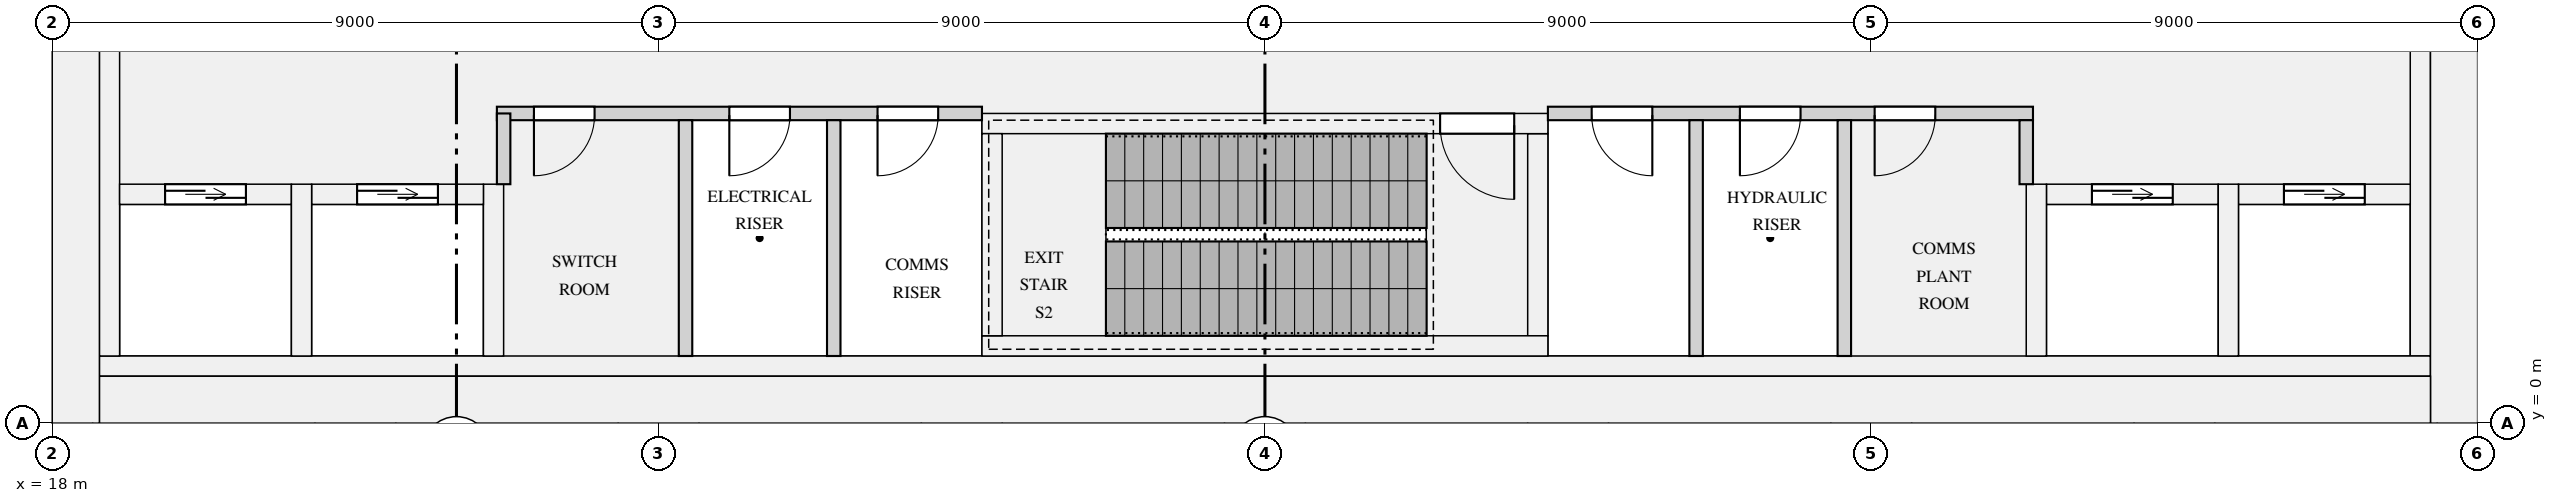
"""IFC4 building model, lengths in metres.
Left out: names, types, materials, properties, quantities, classifications, styles, units other than length and angle.
Written with IfcOpenShell. Run it as: python <this file> out.ifc"""

import sys

from ifc_helpers import new_model, si_unit, direction, frame, frame_2d, origin, place, context, subcontext, project, spatial, rectangle, extrude, element, fill, save


model = new_model("IFC4")
c1 = context("Model", 3, precision=1e-05, world=origin(), true_north=direction((0.0, 1.0)))
c2 = subcontext(c1, "Body", "Model", "MODEL_VIEW")
j1 = project(units=[si_unit("LENGTHUNIT", "METRE"), si_unit("PLANEANGLEUNIT", "RADIAN")], contexts=[c1])
p1 = place(None, origin())
s1 = spatial("IfcSite", under=j1, at=p1, CompositionType="ELEMENT")
p2 = place(p1, origin())
s2 = spatial("IfcBuilding", under=s1, at=p2, CompositionType="ELEMENT")
p3 = place(p2, frame((0.0, 0.0, 185.4)))
s3 = spatial("IfcBuildingStorey", under=s2, at=p3, CompositionType="ELEMENT", Elevation=185.4)
for number, where, z_axis, x_axis in (
    (1, (18.35, 0.0, 0.0), (0.0, 0.0, 1.0), (0.0, 1.0, 0.0)),
    (2, (53.65, 0.0, 0.0), (0.0, 0.0, 1.0), (0.0, 1.0, 0.0)),
):
    element("IfcWall", number, at=place(p3, frame(where, z_axis=z_axis, x_axis=x_axis)), inside=s3, PredefinedType="SHEAR", context=c2, shape_type="SweptSolid", body=[
        extrude(rectangle(XDim=12.5, YDim=0.7, at=frame_2d((6.25, 0.0))), origin(), (0.0, 0.0, 1.0), 6.3),
    ])
p4 = place(p3, frame((18.7, 0.35, 0.0), z_axis=(0.0, 0.0, 1.0), x_axis=(1.0, 0.0, 0.0)))
e3 = element("IfcWall", 3, at=p4, inside=s3, PredefinedType="SHEAR", context=c2, shape_type="SweptSolid", body=[
    extrude(rectangle(XDim=34.6, YDim=0.7, at=frame_2d((17.3, 0.0))), origin(), (0.0, 0.0, 1.0), 6.3),
])
for number, where, z_axis, x_axis in (
    (4, (18.85, 1.0, 0.0), (0.0, 0.0, 1.0), (0.0, 1.0, 0.0)),
    (5, (53.15, 1.0, 0.0), (0.0, 0.0, 1.0), (0.0, 1.0, 0.0)),
):
    element("IfcWall", number, at=place(p3, frame(where, z_axis=z_axis, x_axis=x_axis)), inside=s3, PredefinedType="SHEAR", context=c2, shape_type="SweptSolid", body=[
        extrude(rectangle(XDim=10.9, YDim=0.3, at=frame_2d((5.45, 0.0))), origin(), (0.0, 0.0, 1.0), 6.3),
    ])
p5 = place(p3, frame((18.7, 0.85, 0.0), z_axis=(0.0, 0.0, 1.0), x_axis=(1.0, 0.0, 0.0)))
e6 = element("IfcWall", 6, at=p5, inside=s3, PredefinedType="SHEAR", context=c2, shape_type="SweptSolid", body=[
    extrude(rectangle(XDim=34.6, YDim=0.3, at=frame_2d((17.3, 0.0))), origin(), (0.0, 0.0, 1.0), 6.3),
])
p6 = place(p3, frame((19.0, 3.4, 0.0), z_axis=(0.0, 0.0, 1.0), x_axis=(1.0, 0.0, 0.0)))
e7 = element("IfcWall", 7, at=p6, inside=s3, PredefinedType="SHEAR", context=c2, shape_type="SweptSolid", body=[
    extrude(rectangle(XDim=2.55, YDim=0.3, at=frame_2d((1.275, 0.0))), origin(), (0.0, 0.0, 1.0), 6.3),
])
p7 = place(p6, frame((0.675, 0.0, 0.0)))
e8 = element("IfcOpeningElement", 8, at=p7, cuts=e7, PredefinedType="OPENING", context=c2, shape_type="SweptSolid", body=[
    extrude(rectangle(XDim=1.2, YDim=2.1, at=frame_2d((0.6, 1.05))), frame((0.0, 0.16, 0.0), z_axis=(0.0, -1.0, 0.0), x_axis=(1.0, 0.0, 0.0)), (0.0, 0.0, 1.0), 0.32),
])
p8 = place(p3, frame((21.85, 3.4, 0.0), z_axis=(0.0, 0.0, 1.0), x_axis=(1.0, 0.0, 0.0)))
e9 = element("IfcWall", 9, at=p8, inside=s3, PredefinedType="SHEAR", context=c2, shape_type="SweptSolid", body=[
    extrude(rectangle(XDim=2.55, YDim=0.3, at=frame_2d((1.275, 0.0))), origin(), (0.0, 0.0, 1.0), 6.3),
])
p9 = place(p8, frame((0.675, 0.0, 0.0)))
e10 = element("IfcOpeningElement", 10, at=p9, cuts=e9, PredefinedType="OPENING", context=c2, shape_type="SweptSolid", body=[
    extrude(rectangle(XDim=1.2, YDim=2.1, at=frame_2d((0.6, 1.05))), frame((0.0, 0.16, 0.0), z_axis=(0.0, -1.0, 0.0), x_axis=(1.0, 0.0, 0.0)), (0.0, 0.0, 1.0), 0.32),
])
for number, where, z_axis, x_axis in (
    (11, (21.7, 1.0, 0.0), (0.0, 0.0, 1.0), (0.0, 1.0, 0.0)),
    (12, (24.55, 1.0, 0.0), (0.0, 0.0, 1.0), (0.0, 1.0, 0.0)),
):
    element("IfcWall", number, at=place(p3, frame(where, z_axis=z_axis, x_axis=x_axis)), inside=s3, PredefinedType="SHEAR", context=c2, shape_type="SweptSolid", body=[
        extrude(rectangle(XDim=2.55, YDim=0.3, at=frame_2d((1.275, 0.0))), origin(), (0.0, 0.0, 1.0), 6.3),
    ])
p10 = place(p3, frame((47.6, 3.4, 0.0), z_axis=(0.0, 0.0, 1.0), x_axis=(1.0, 0.0, 0.0)))
e13 = element("IfcWall", 13, at=p10, inside=s3, PredefinedType="SHEAR", context=c2, shape_type="SweptSolid", body=[
    extrude(rectangle(XDim=2.55, YDim=0.3, at=frame_2d((1.275, 0.0))), origin(), (0.0, 0.0, 1.0), 6.3),
])
p11 = place(p10, frame((0.675, 0.0, 0.0)))
e14 = element("IfcOpeningElement", 14, at=p11, cuts=e13, PredefinedType="OPENING", context=c2, shape_type="SweptSolid", body=[
    extrude(rectangle(XDim=1.2, YDim=2.1, at=frame_2d((0.6, 1.05))), frame((0.0, 0.16, 0.0), z_axis=(0.0, -1.0, 0.0), x_axis=(1.0, 0.0, 0.0)), (0.0, 0.0, 1.0), 0.32),
])
p12 = place(p3, frame((47.45, 1.0, 0.0), z_axis=(0.0, 0.0, 1.0), x_axis=(0.0, 1.0, 0.0)))
e15 = element("IfcWall", 15, at=p12, inside=s3, PredefinedType="SHEAR", context=c2, shape_type="SweptSolid", body=[
    extrude(rectangle(XDim=2.55, YDim=0.3, at=frame_2d((1.275, 0.0))), origin(), (0.0, 0.0, 1.0), 6.3),
])
p13 = place(p3, frame((50.45, 3.4, 0.0), z_axis=(0.0, 0.0, 1.0), x_axis=(1.0, 0.0, 0.0)))
e16 = element("IfcWall", 16, at=p13, inside=s3, PredefinedType="SHEAR", context=c2, shape_type="SweptSolid", body=[
    extrude(rectangle(XDim=2.55, YDim=0.3, at=frame_2d((1.275, 0.0))), origin(), (0.0, 0.0, 1.0), 6.3),
])
p14 = place(p13, frame((0.675, 0.0, 0.0)))
e17 = element("IfcOpeningElement", 17, at=p14, cuts=e16, PredefinedType="OPENING", context=c2, shape_type="SweptSolid", body=[
    extrude(rectangle(XDim=1.2, YDim=2.1, at=frame_2d((0.6, 1.05))), frame((0.0, 0.16, 0.0), z_axis=(0.0, -1.0, 0.0), x_axis=(1.0, 0.0, 0.0)), (0.0, 0.0, 1.0), 0.32),
])
p15 = place(p3, frame((50.3, 1.0, 0.0), z_axis=(0.0, 0.0, 1.0), x_axis=(0.0, 1.0, 0.0)))
e18 = element("IfcWall", 18, at=p15, inside=s3, PredefinedType="SHEAR", context=c2, shape_type="SweptSolid", body=[
    extrude(rectangle(XDim=2.55, YDim=0.3, at=frame_2d((1.275, 0.0))), origin(), (0.0, 0.0, 1.0), 6.3),
])
p16 = place(p3, frame((31.8, 1.15, 0.0), z_axis=(0.0, 0.0, 1.0), x_axis=(1.0, 0.0, 0.0)))
e19 = element("IfcWall", 19, at=p16, inside=s3, PredefinedType="SHEAR", context=c2, shape_type="SweptSolid", body=[
    extrude(rectangle(XDim=8.4, YDim=0.3, at=frame_2d((4.2, 0.0))), origin(), (0.0, 0.0, 1.0), 6.3),
])
p17 = place(p3, frame((31.8, 4.45, 0.0), z_axis=(0.0, 0.0, 1.0), x_axis=(1.0, 0.0, 0.0)))
e20 = element("IfcWall", 20, at=p17, inside=s3, PredefinedType="SHEAR", context=c2, shape_type="SweptSolid", body=[
    extrude(rectangle(XDim=8.4, YDim=0.3, at=frame_2d((4.2, 0.0))), origin(), (0.0, 0.0, 1.0), 6.3),
])
p18 = place(p17, frame((6.8, 0.0, 0.0)))
e21 = element("IfcOpeningElement", 21, at=p18, cuts=e20, PredefinedType="OPENING", context=c2, shape_type="SweptSolid", body=[
    extrude(rectangle(XDim=1.1, YDim=2.1, at=frame_2d((0.55, 1.05))), frame((0.0, 0.16, 0.0), z_axis=(0.0, -1.0, 0.0), x_axis=(1.0, 0.0, 0.0)), (0.0, 0.0, 1.0), 0.32),
])
for number, where, z_axis, x_axis in (
    (22, (31.95, 1.3, 0.0), (0.0, 0.0, 1.0), (0.0, 1.0, 0.0)),
    (23, (40.05, 1.3, 0.0), (0.0, 0.0, 1.0), (0.0, 1.0, 0.0)),
):
    element("IfcWall", number, at=place(p3, frame(where, z_axis=z_axis, x_axis=x_axis)), inside=s3, PredefinedType="SHEAR", context=c2, shape_type="SweptSolid", body=[
        extrude(rectangle(XDim=3.0, YDim=0.3, at=frame_2d((1.5, 0.0))), origin(), (0.0, 0.0, 1.0), 6.3),
    ])
p19 = place(p3, frame((24.6, 4.6, 0.0), z_axis=(0.0, 0.0, 1.0), x_axis=(1.0, 0.0, 0.0)))
e24 = element("IfcWall", 24, at=p19, inside=s3, PredefinedType="PARTITIONING", context=c2, shape_type="SweptSolid", body=[
    extrude(rectangle(XDim=7.2, YDim=0.2, at=frame_2d((3.6, 0.0))), origin(), (0.0, 0.0, 1.0), 5.8),
])
p20 = place(p19, frame((0.55, 0.0, 0.0)))
e25 = element("IfcOpeningElement", 25, at=p20, cuts=e24, PredefinedType="OPENING", context=c2, shape_type="SweptSolid", body=[
    extrude(rectangle(XDim=0.9, YDim=2.1, at=frame_2d((0.45, 1.05))), frame((0.0, 0.11, 0.0), z_axis=(0.0, -1.0, 0.0), x_axis=(1.0, 0.0, 0.0)), (0.0, 0.0, 1.0), 0.22),
])
p21 = place(p19, frame((3.45, 0.0, 0.0)))
e26 = element("IfcOpeningElement", 26, at=p21, cuts=e24, PredefinedType="OPENING", context=c2, shape_type="SweptSolid", body=[
    extrude(rectangle(XDim=0.9, YDim=2.1, at=frame_2d((0.45, 1.05))), frame((0.0, 0.11, 0.0), z_axis=(0.0, -1.0, 0.0), x_axis=(1.0, 0.0, 0.0)), (0.0, 0.0, 1.0), 0.22),
])
p22 = place(p19, frame((5.65, 0.0, 0.0)))
e27 = element("IfcOpeningElement", 27, at=p22, cuts=e24, PredefinedType="OPENING", context=c2, shape_type="SweptSolid", body=[
    extrude(rectangle(XDim=0.9, YDim=2.1, at=frame_2d((0.45, 1.05))), frame((0.0, 0.11, 0.0), z_axis=(0.0, -1.0, 0.0), x_axis=(1.0, 0.0, 0.0)), (0.0, 0.0, 1.0), 0.22),
])
p23 = place(p3, frame((40.2, 4.6, 0.0), z_axis=(0.0, 0.0, 1.0), x_axis=(1.0, 0.0, 0.0)))
e28 = element("IfcWall", 28, at=p23, inside=s3, PredefinedType="PARTITIONING", context=c2, shape_type="SweptSolid", body=[
    extrude(rectangle(XDim=7.2, YDim=0.2, at=frame_2d((3.6, 0.0))), origin(), (0.0, 0.0, 1.0), 5.8),
])
p24 = place(p23, frame((4.85, 0.0, 0.0)))
e29 = element("IfcOpeningElement", 29, at=p24, cuts=e28, PredefinedType="OPENING", context=c2, shape_type="SweptSolid", body=[
    extrude(rectangle(XDim=0.9, YDim=2.1, at=frame_2d((0.45, 1.05))), frame((0.0, 0.11, 0.0), z_axis=(0.0, -1.0, 0.0), x_axis=(1.0, 0.0, 0.0)), (0.0, 0.0, 1.0), 0.22),
])
p25 = place(p23, frame((0.65, 0.0, 0.0)))
e30 = element("IfcOpeningElement", 30, at=p25, cuts=e28, PredefinedType="OPENING", context=c2, shape_type="SweptSolid", body=[
    extrude(rectangle(XDim=0.9, YDim=2.1, at=frame_2d((0.45, 1.05))), frame((0.0, 0.11, 0.0), z_axis=(0.0, -1.0, 0.0), x_axis=(1.0, 0.0, 0.0)), (0.0, 0.0, 1.0), 0.22),
])
p26 = place(p23, frame((2.85, 0.0, 0.0)))
e31 = element("IfcOpeningElement", 31, at=p26, cuts=e28, PredefinedType="OPENING", context=c2, shape_type="SweptSolid", body=[
    extrude(rectangle(XDim=0.9, YDim=2.1, at=frame_2d((0.45, 1.05))), frame((0.0, 0.11, 0.0), z_axis=(0.0, -1.0, 0.0), x_axis=(1.0, 0.0, 0.0)), (0.0, 0.0, 1.0), 0.22),
])
for number, where, z_axis, x_axis in (
    (32, (27.4, 1.0, 0.0), (0.0, 0.0, 1.0), (0.0, 1.0, 0.0)),
    (33, (29.6, 1.0, 0.0), (0.0, 0.0, 1.0), (0.0, 1.0, 0.0)),
    (34, (42.4, 1.0, 0.0), (0.0, 0.0, 1.0), (0.0, 1.0, 0.0)),
    (35, (44.6, 1.0, 0.0), (0.0, 0.0, 1.0), (0.0, 1.0, 0.0)),
):
    element("IfcWall", number, at=place(p3, frame(where, z_axis=z_axis, x_axis=x_axis)), inside=s3, PredefinedType="PARTITIONING", context=c2, shape_type="SweptSolid", body=[
        extrude(rectangle(XDim=3.5, YDim=0.2, at=frame_2d((1.75, 0.0))), origin(), (0.0, 0.0, 1.0), 5.8),
    ])
p27 = place(p3, frame((24.7, 3.55, 0.0), z_axis=(0.0, 0.0, 1.0), x_axis=(0.0, 1.0, 0.0)))
e36 = element("IfcWall", 36, at=p27, inside=s3, PredefinedType="PARTITIONING", context=c2, shape_type="SweptSolid", body=[
    extrude(rectangle(XDim=1.05, YDim=0.2, at=frame_2d((0.525, 0.0))), origin(), (0.0, 0.0, 1.0), 5.8),
])
p28 = place(p3, frame((47.3, 3.55, 0.0), z_axis=(0.0, 0.0, 1.0), x_axis=(0.0, 1.0, 0.0)))
e37 = element("IfcWall", 37, at=p28, inside=s3, PredefinedType="PARTITIONING", context=c2, shape_type="SweptSolid", body=[
    extrude(rectangle(XDim=0.95, YDim=0.2, at=frame_2d((0.475, 0.0))), origin(), (0.0, 0.0, 1.0), 5.8),
])
p29 = place(p7, origin())
e38 = element("IfcDoor", 38, at=p29, inside=s3, OperationType="DOUBLE_DOOR_SLIDING", PredefinedType="DOOR", context=c2, shape_type="SweptSolid", body=[
    extrude(rectangle(XDim=1.2, YDim=2.1, at=frame_2d((0.6, 1.05))), frame((0.0, 0.025, 0.0), z_axis=(0.0, -1.0, 0.0), x_axis=(1.0, 0.0, 0.0)), (0.0, 0.0, 1.0), 0.05),
])
fill(e8, e38)
p30 = place(p9, origin())
e39 = element("IfcDoor", 39, at=p30, inside=s3, OperationType="DOUBLE_DOOR_SLIDING", PredefinedType="DOOR", context=c2, shape_type="SweptSolid", body=[
    extrude(rectangle(XDim=1.2, YDim=2.1, at=frame_2d((0.6, 1.05))), frame((0.0, 0.025, 0.0), z_axis=(0.0, -1.0, 0.0), x_axis=(1.0, 0.0, 0.0)), (0.0, 0.0, 1.0), 0.05),
])
fill(e10, e39)
p31 = place(p11, origin())
e40 = element("IfcDoor", 40, at=p31, inside=s3, OperationType="DOUBLE_DOOR_SLIDING", PredefinedType="DOOR", context=c2, shape_type="SweptSolid", body=[
    extrude(rectangle(XDim=1.2, YDim=2.1, at=frame_2d((0.6, 1.05))), frame((0.0, 0.025, 0.0), z_axis=(0.0, -1.0, 0.0), x_axis=(1.0, 0.0, 0.0)), (0.0, 0.0, 1.0), 0.05),
])
fill(e14, e40)
p32 = place(p14, origin())
e41 = element("IfcDoor", 41, at=p32, inside=s3, OperationType="DOUBLE_DOOR_SLIDING", PredefinedType="DOOR", context=c2, shape_type="SweptSolid", body=[
    extrude(rectangle(XDim=1.2, YDim=2.1, at=frame_2d((0.6, 1.05))), frame((0.0, 0.025, 0.0), z_axis=(0.0, -1.0, 0.0), x_axis=(1.0, 0.0, 0.0)), (0.0, 0.0, 1.0), 0.05),
])
fill(e17, e41)
p33 = place(p18, frame((1.1, 0.0, 0.0), z_axis=(0.0, 0.0, 1.0), x_axis=(-1.0, 0.0, 0.0)))
e42 = element("IfcDoor", 42, at=p33, inside=s3, OperationType="SINGLE_SWING_LEFT", PredefinedType="DOOR", context=c2, shape_type="SweptSolid", body=[
    extrude(rectangle(XDim=1.1, YDim=2.1, at=frame_2d((0.55, 1.05))), frame((0.0, 0.025, 0.0), z_axis=(0.0, -1.0, 0.0), x_axis=(1.0, 0.0, 0.0)), (0.0, 0.0, 1.0), 0.05),
])
fill(e21, e42)
p34 = place(p20, frame((0.9, 0.0, 0.0), z_axis=(0.0, 0.0, 1.0), x_axis=(-1.0, 0.0, 0.0)))
e43 = element("IfcDoor", 43, at=p34, inside=s3, OperationType="SINGLE_SWING_RIGHT", PredefinedType="DOOR", context=c2, shape_type="SweptSolid", body=[
    extrude(rectangle(XDim=0.9, YDim=2.1, at=frame_2d((0.45, 1.05))), frame((0.0, 0.025, 0.0), z_axis=(0.0, -1.0, 0.0), x_axis=(1.0, 0.0, 0.0)), (0.0, 0.0, 1.0), 0.05),
])
fill(e25, e43)
p35 = place(p24, frame((0.9, 0.0, 0.0), z_axis=(0.0, 0.0, 1.0), x_axis=(-1.0, 0.0, 0.0)))
e44 = element("IfcDoor", 44, at=p35, inside=s3, OperationType="SINGLE_SWING_RIGHT", PredefinedType="DOOR", context=c2, shape_type="SweptSolid", body=[
    extrude(rectangle(XDim=0.9, YDim=2.1, at=frame_2d((0.45, 1.05))), frame((0.0, 0.025, 0.0), z_axis=(0.0, -1.0, 0.0), x_axis=(1.0, 0.0, 0.0)), (0.0, 0.0, 1.0), 0.05),
])
fill(e29, e44)
p36 = place(p21, frame((0.9, 0.0, 0.0), z_axis=(0.0, 0.0, 1.0), x_axis=(-1.0, 0.0, 0.0)))
e45 = element("IfcDoor", 45, at=p36, inside=s3, OperationType="SINGLE_SWING_RIGHT", PredefinedType="DOOR", context=c2, shape_type="SweptSolid", body=[
    extrude(rectangle(XDim=0.9, YDim=2.1, at=frame_2d((0.45, 1.05))), frame((0.0, 0.025, 0.0), z_axis=(0.0, -1.0, 0.0), x_axis=(1.0, 0.0, 0.0)), (0.0, 0.0, 1.0), 0.05),
])
fill(e26, e45)
p37 = place(p22, frame((0.9, 0.0, 0.0), z_axis=(0.0, 0.0, 1.0), x_axis=(-1.0, 0.0, 0.0)))
e46 = element("IfcDoor", 46, at=p37, inside=s3, OperationType="SINGLE_SWING_RIGHT", PredefinedType="DOOR", context=c2, shape_type="SweptSolid", body=[
    extrude(rectangle(XDim=0.9, YDim=2.1, at=frame_2d((0.45, 1.05))), frame((0.0, 0.025, 0.0), z_axis=(0.0, -1.0, 0.0), x_axis=(1.0, 0.0, 0.0)), (0.0, 0.0, 1.0), 0.05),
])
fill(e27, e46)
p38 = place(p25, frame((0.9, 0.0, 0.0), z_axis=(0.0, 0.0, 1.0), x_axis=(-1.0, 0.0, 0.0)))
e47 = element("IfcDoor", 47, at=p38, inside=s3, OperationType="SINGLE_SWING_LEFT", PredefinedType="DOOR", context=c2, shape_type="SweptSolid", body=[
    extrude(rectangle(XDim=0.9, YDim=2.1, at=frame_2d((0.45, 1.05))), frame((0.0, 0.025, 0.0), z_axis=(0.0, -1.0, 0.0), x_axis=(1.0, 0.0, 0.0)), (0.0, 0.0, 1.0), 0.05),
])
fill(e30, e47)
p39 = place(p26, frame((0.9, 0.0, 0.0), z_axis=(0.0, 0.0, 1.0), x_axis=(-1.0, 0.0, 0.0)))
e48 = element("IfcDoor", 48, at=p39, inside=s3, OperationType="SINGLE_SWING_RIGHT", PredefinedType="DOOR", context=c2, shape_type="SweptSolid", body=[
    extrude(rectangle(XDim=0.9, YDim=2.1, at=frame_2d((0.45, 1.05))), frame((0.0, 0.025, 0.0), z_axis=(0.0, -1.0, 0.0), x_axis=(1.0, 0.0, 0.0)), (0.0, 0.0, 1.0), 0.05),
])
fill(e31, e48)
save(model, sys.argv[1])
